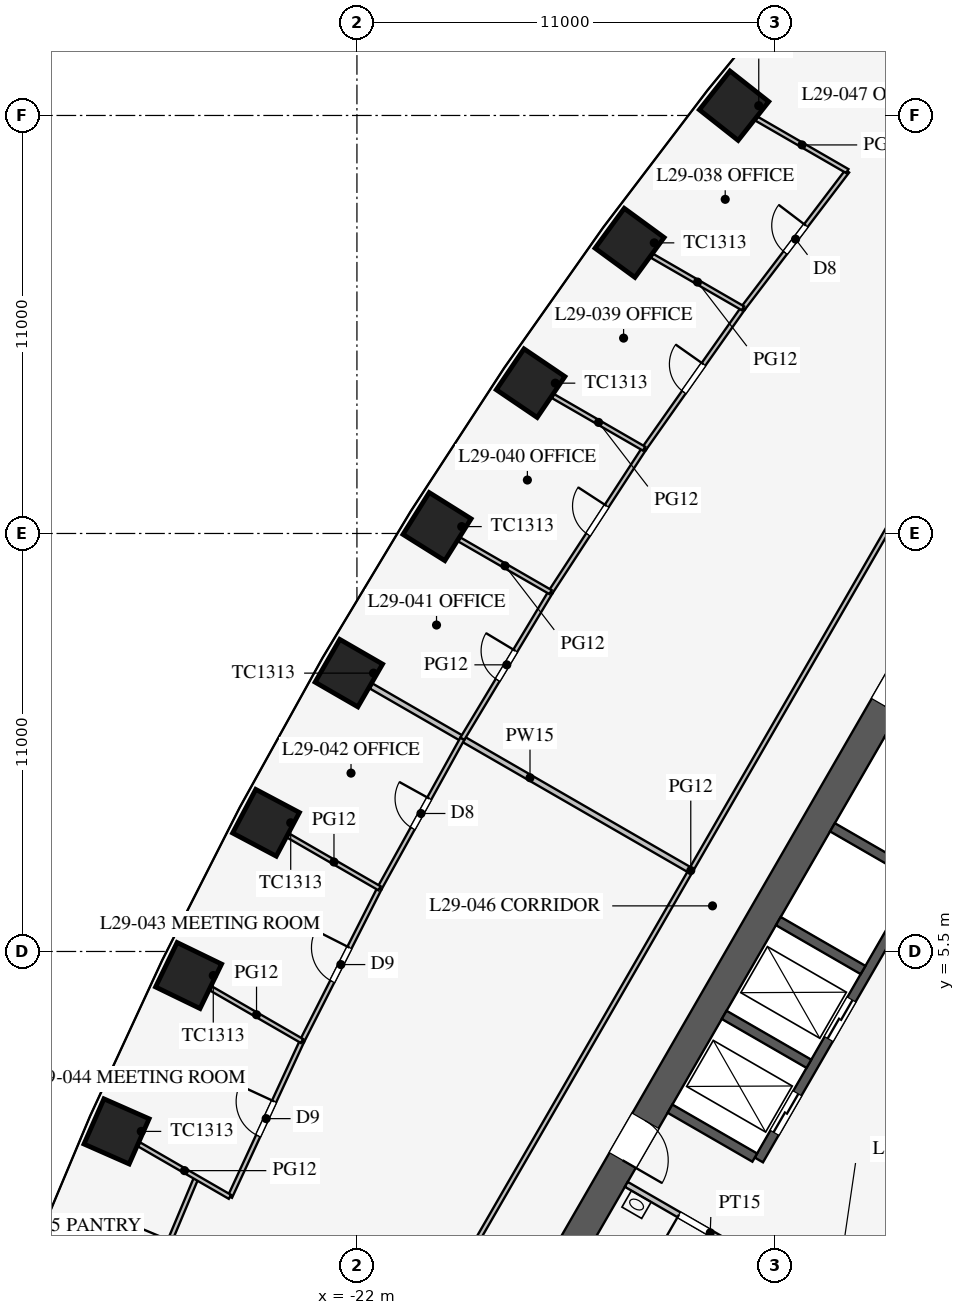
"""IFC4 building model, lengths in metres.
Left out: names, types, materials, properties, quantities, classifications, styles, units other than length and angle.
Written with IfcOpenShell. Run it as: python <this file> out.ifc"""

import sys

from ifc_helpers import new_model, si_unit, direction, frame, frame_2d, origin, origin_2d, place, context, subcontext, project, spatial, rectangle, extrude, element, fill, save


model = new_model("IFC4")
c1 = context("Model", 3, precision=1e-05, world=origin(), true_north=direction((0.0, 1.0)))
c2 = subcontext(c1, "Body", "Model", "MODEL_VIEW")
j1 = project(units=[si_unit("LENGTHUNIT", "METRE"), si_unit("PLANEANGLEUNIT", "RADIAN")], contexts=[c1])
p1 = place(None, origin())
s1 = spatial("IfcSite", under=j1, at=p1, CompositionType="ELEMENT")
p2 = place(p1, origin())
s2 = spatial("IfcBuilding", under=s1, at=p2, CompositionType="ELEMENT")
p3 = place(p2, frame((0.0, 0.0, 128.3)))
s3 = spatial("IfcBuildingStorey", under=s2, at=p3, CompositionType="ELEMENT", Elevation=128.3)
for number, where, z_axis, x_axis in (
    (1, (-12.077, 27.757, 0.0), (0.0, 0.0, 1.0), (-0.62, -0.785, 0.0)),
    (2, (-14.825, 24.148, 0.0), (0.0, 0.0, 1.0), (-0.591, -0.807, 0.0)),
    (3, (-17.43, 20.456, 0.0), (0.0, 0.0, 1.0), (-0.561, -0.828, 0.0)),
    (4, (-19.893, 16.681, 0.0), (0.0, 0.0, 1.0), (-0.531, -0.847, 0.0)),
    (5, (-22.213, 12.825, 0.0), (0.0, 0.0, 1.0), (-0.5, -0.866, 0.0)),
    (6, (-24.393, 8.887, 0.0), (0.0, 0.0, 1.0), (-0.468, -0.883, 0.0)),
    (7, (-26.43, 4.867, 0.0), (0.0, 0.0, 1.0), (-0.436, -0.9, 0.0)),
    (8, (-28.325, 0.765, 0.0), (0.0, 0.0, 1.0), (-0.403, -0.915, 0.0)),
):
    element("IfcColumn", number, at=place(p3, frame(where, z_axis=z_axis, x_axis=x_axis)), inside=s3, PredefinedType="COLUMN", context=c2, shape_type="SweptSolid", body=[
        extrude(rectangle(XDim=1.3, YDim=1.3, at=origin_2d()), origin(), (0.0, 0.0, 1.0), 4.2),
    ])
p4 = place(p3, frame((-5.773, 16.0, 0.0), z_axis=(0.0, 0.0, 1.0), x_axis=(-0.500002442456, -0.866023993627, 0.0)))
e9 = element("IfcWall", 9, at=p4, inside=s3, PredefinedType="SHEAR", context=c2, shape_type="SweptSolid", body=[
    extrude(rectangle(XDim=21.939, YDim=0.8, at=frame_2d((10.97, 0.0))), origin(), (0.0, 0.0, 1.0), 4.2),
])
p5 = place(p4, frame((17.27, 0.0, 0.0)))
e10 = element("IfcOpeningElement", 10, at=p5, cuts=e9, PredefinedType="OPENING", context=c2, shape_type="SweptSolid", body=[
    extrude(rectangle(XDim=1.2, YDim=2.1, at=frame_2d((0.6, 1.05))), frame((0.0, 0.41, 0.0), z_axis=(0.0, -1.0, 0.0), x_axis=(1.0, 0.0, 0.0)), (0.0, 0.0, 1.0), 0.82),
])
p6 = place(p4, frame((3.47, 0.0, 0.0)))
e11 = element("IfcOpeningElement", 11, at=p6, cuts=e9, PredefinedType="OPENING", context=c2, shape_type="SweptSolid", body=[
    extrude(rectangle(XDim=1.2, YDim=2.1, at=frame_2d((0.6, 1.05))), frame((0.0, 0.41, 0.0), z_axis=(0.0, -1.0, 0.0), x_axis=(1.0, 0.0, 0.0)), (0.0, 0.0, 1.0), 0.82),
])
p7 = place(p3, frame((-5.724, 9.886, 0.0), z_axis=(0.0, 0.0, 1.0), x_axis=(-0.500001763848, -0.866024385424, 0.0)))
e12 = element("IfcWall", 12, at=p7, inside=s3, PredefinedType="SHEAR", context=c2, shape_type="SweptSolid", body=[
    extrude(rectangle(XDim=11.4, YDim=0.25, at=frame_2d((5.7, 0.0))), origin(), (0.0, 0.0, 1.0), 4.2),
])
p8 = place(p7, frame((6.525, 0.0, 0.0)))
e13 = element("IfcOpeningElement", 13, at=p8, cuts=e12, PredefinedType="OPENING", context=c2, shape_type="SweptSolid", body=[
    extrude(rectangle(XDim=1.2, YDim=2.2, at=frame_2d((0.6, 1.1))), frame((0.0, 0.135, 0.0), z_axis=(0.0, -1.0, 0.0), x_axis=(1.0, 0.0, 0.0)), (0.0, 0.0, 1.0), 0.27),
])
p9 = place(p7, frame((9.375, 0.0, 0.0)))
e14 = element("IfcOpeningElement", 14, at=p9, cuts=e12, PredefinedType="OPENING", context=c2, shape_type="SweptSolid", body=[
    extrude(rectangle(XDim=1.2, YDim=2.2, at=frame_2d((0.6, 1.1))), frame((0.0, 0.135, 0.0), z_axis=(0.0, -1.0, 0.0), x_axis=(1.0, 0.0, 0.0)), (0.0, 0.0, 1.0), 0.27),
])
p10 = place(p3, frame((-5.832, 9.949, 0.0), z_axis=(0.0, 0.0, 1.0), x_axis=(-0.866029291668, 0.499993265928, 0.0)))
e15 = element("IfcWall", 15, at=p10, inside=s3, PredefinedType="SHEAR", context=c2, shape_type="SweptSolid", body=[
    extrude(rectangle(XDim=2.575, YDim=0.25, at=frame_2d((1.288, 0.0))), origin(), (0.0, 0.0, 1.0), 4.2),
])
for number, where, z_axis, x_axis in (
    (16, (-7.257, 7.481, 0.0), (0.0, 0.0, 1.0), (-0.866, 0.5, 0.0)),
    (17, (-8.682, 5.012, 0.0), (0.0, 0.0, 1.0), (-0.866, 0.5, 0.0)),
    (18, (-10.107, 2.544, 0.0), (0.0, 0.0, 1.0), (-0.866, 0.5, 0.0)),
    (19, (-11.532, 0.076, 0.0), (0.0, 0.0, 1.0), (-0.866, 0.5, 0.0)),
):
    element("IfcWall", number, at=place(p3, frame(where, z_axis=z_axis, x_axis=x_axis)), inside=s3, PredefinedType="SHEAR", context=c2, shape_type="SweptSolid", body=[
        extrude(rectangle(XDim=2.575, YDim=0.25, at=frame_2d((1.288, 0.0))), origin(), (0.0, 0.0, 1.0), 4.2),
    ])
p11 = place(p3, frame((-6.663, -1.509, 0.0), z_axis=(0.0, 0.0, 1.0), x_axis=(-0.866019375473, -0.500010441196, 0.0)))
e20 = element("IfcWall", 20, at=p11, inside=s3, PredefinedType="SHEAR", context=c2, shape_type="SweptSolid", body=[
    extrude(rectangle(XDim=9.075, YDim=0.6, at=frame_2d((4.538, 0.0))), origin(), (0.0, 0.0, 1.0), 4.2),
])
p12 = place(p3, frame((-10.495, -3.178, 0.0), z_axis=(0.0, 0.0, 1.0), x_axis=(-0.86602216432, 0.500005610874, 0.0)))
e21 = element("IfcWall", 21, at=p12, inside=s3, PredefinedType="PARTITIONING", context=c2, shape_type="SweptSolid", body=[
    extrude(rectangle(XDim=5.1, YDim=0.15, at=frame_2d((2.55, 0.0))), origin(), (0.0, 0.0, 1.0), 4.0),
])
p13 = place(p12, frame((2.6, 0.0, 0.0)))
e22 = element("IfcOpeningElement", 22, at=p13, cuts=e21, PredefinedType="OPENING", context=c2, shape_type="SweptSolid", body=[
    extrude(rectangle(XDim=0.9, YDim=2.1, at=frame_2d((0.45, 1.05))), frame((0.0, 0.085, 0.0), z_axis=(0.0, -1.0, 0.0), x_axis=(1.0, 0.0, 0.0)), (0.0, 0.0, 1.0), 0.17),
])
p14 = place(p3, frame((-13.268, 7.66, 0.0), z_axis=(0.0, 0.0, 1.0), x_axis=(-0.866015788683, 0.500016653474, 0.0)))
e23 = element("IfcWall", 23, at=p14, inside=s3, PredefinedType="PARTITIONING", context=c2, shape_type="SweptSolid", body=[
    extrude(rectangle(XDim=9.65, YDim=0.15, at=frame_2d((4.825, 0.0))), origin(), (0.0, 0.0, 1.0), 3.2),
])
p15 = place(p3, frame((-0.016, 30.491, 0.0), z_axis=(0.0, 0.0, 1.0), x_axis=(-0.50000091641, -0.866024874695, 0.0)))
e24 = element("IfcWall", 24, at=p15, inside=s3, PredefinedType="PARTITIONING", context=c2, shape_type="SweptSolid", body=[
    extrude(rectangle(XDim=52.796, YDim=0.12, at=frame_2d((26.398, 0.0))), origin(), (0.0, 0.0, 1.0), 2.9),
])
p16 = place(p15, frame((10.2, 0.0, 0.15)))
e25 = element("IfcOpeningElement", 25, at=p16, cuts=e24, PredefinedType="OPENING", context=c2, shape_type="SweptSolid", body=[
    extrude(rectangle(XDim=1.8, YDim=2.1, at=frame_2d((0.9, 1.05))), frame((0.0, 0.07, 0.0), z_axis=(0.0, -1.0, 0.0), x_axis=(1.0, 0.0, 0.0)), (0.0, 0.0, 1.0), 0.14),
])
p17 = place(p15, frame((40.8, 0.0, 0.15)))
e26 = element("IfcOpeningElement", 26, at=p17, cuts=e24, PredefinedType="OPENING", context=c2, shape_type="SweptSolid", body=[
    extrude(rectangle(XDim=1.8, YDim=2.1, at=frame_2d((0.9, 1.05))), frame((0.0, 0.07, 0.0), z_axis=(0.0, -1.0, 0.0), x_axis=(1.0, 0.0, 0.0)), (0.0, 0.0, 1.0), 0.14),
])
p18 = place(p3, frame((-19.226, 11.1, 0.0), z_axis=(0.0, 0.0, 1.0), x_axis=(-0.484292898211, -0.874905931368, 0.0)))
e27 = element("IfcWall", 27, at=p18, inside=s3, PredefinedType="PARTITIONING", context=c2, shape_type="SweptSolid", body=[
    extrude(rectangle(XDim=4.501, YDim=0.12, at=frame_2d((2.25, 0.0))), origin(), (0.0, 0.0, 1.0), 2.9),
])
p19 = place(p18, frame((1.8, 0.0, 0.15)))
e28 = element("IfcOpeningElement", 28, at=p19, cuts=e27, PredefinedType="OPENING", context=c2, shape_type="SweptSolid", body=[
    extrude(rectangle(XDim=0.9, YDim=2.1, at=frame_2d((0.45, 1.05))), frame((0.0, 0.07, 0.0), z_axis=(0.0, -1.0, 0.0), x_axis=(1.0, 0.0, 0.0)), (0.0, 0.0, 1.0), 0.14),
])
p20 = place(p3, frame((-26.225, -0.448, 0.0), z_axis=(0.0, 0.0, 1.0), x_axis=(-0.386762112496, -0.922179520667, 0.0)))
e29 = element("IfcWall", 29, at=p20, inside=s3, PredefinedType="PARTITIONING", context=c2, shape_type="SweptSolid", body=[
    extrude(rectangle(XDim=4.536, YDim=0.12, at=frame_2d((2.268, 0.0))), origin(), (0.0, 0.0, 1.0), 2.9),
])
p21 = place(p20, frame((1.8, 0.0, 0.15)))
e30 = element("IfcOpeningElement", 30, at=p21, cuts=e29, PredefinedType="OPENING", context=c2, shape_type="SweptSolid", body=[
    extrude(rectangle(XDim=0.9, YDim=2.1, at=frame_2d((0.45, 1.05))), frame((0.0, 0.07, 0.0), z_axis=(0.0, -1.0, 0.0), x_axis=(1.0, 0.0, 0.0)), (0.0, 0.0, 1.0), 0.14),
])
p22 = place(p3, frame((-21.405, 7.162, 0.0), z_axis=(0.0, 0.0, 1.0), x_axis=(-0.452471679136, -0.891778772779, 0.0)))
e31 = element("IfcWall", 31, at=p22, inside=s3, PredefinedType="PARTITIONING", context=c2, shape_type="SweptSolid", body=[
    extrude(rectangle(XDim=4.507, YDim=0.12, at=frame_2d((2.253, 0.0))), origin(), (0.0, 0.0, 1.0), 2.9),
])
p23 = place(p22, frame((1.75, 0.0, 0.15)))
e32 = element("IfcOpeningElement", 32, at=p23, cuts=e31, PredefinedType="OPENING", context=c2, shape_type="SweptSolid", body=[
    extrude(rectangle(XDim=1.0, YDim=2.1, at=frame_2d((0.5, 1.05))), frame((0.0, 0.07, 0.0), z_axis=(0.0, -1.0, 0.0), x_axis=(1.0, 0.0, 0.0)), (0.0, 0.0, 1.0), 0.14),
])
p24 = place(p3, frame((-23.444, 3.143, 0.0), z_axis=(0.0, 0.0, 1.0), x_axis=(-0.419883773418, -0.907577884713, 0.0)))
e33 = element("IfcWall", 33, at=p24, inside=s3, PredefinedType="PARTITIONING", context=c2, shape_type="SweptSolid", body=[
    extrude(rectangle(XDim=4.519, YDim=0.12, at=frame_2d((2.259, 0.0))), origin(), (0.0, 0.0, 1.0), 2.9),
])
p25 = place(p24, frame((1.75, 0.0, 0.15)))
e34 = element("IfcOpeningElement", 34, at=p25, cuts=e33, PredefinedType="OPENING", context=c2, shape_type="SweptSolid", body=[
    extrude(rectangle(XDim=1.0, YDim=2.1, at=frame_2d((0.5, 1.05))), frame((0.0, 0.07, 0.0), z_axis=(0.0, -1.0, 0.0), x_axis=(1.0, 0.0, 0.0)), (0.0, 0.0, 1.0), 0.14),
])
p26 = place(p3, frame((-11.842, 22.425, 0.0), z_axis=(0.0, 0.0, 1.0), x_axis=(-0.576023283708, -0.817433285734, 0.0)))
e35 = element("IfcWall", 35, at=p26, inside=s3, PredefinedType="PARTITIONING", context=c2, shape_type="SweptSolid", body=[
    extrude(rectangle(XDim=4.519, YDim=0.12, at=frame_2d((2.259, 0.0))), origin(), (0.0, 0.0, 1.0), 2.9),
])
p27 = place(p26, frame((1.8, 0.0, 0.15)))
e36 = element("IfcOpeningElement", 36, at=p27, cuts=e35, PredefinedType="OPENING", context=c2, shape_type="SweptSolid", body=[
    extrude(rectangle(XDim=0.9, YDim=2.1, at=frame_2d((0.45, 1.05))), frame((0.0, 0.07, 0.0), z_axis=(0.0, -1.0, 0.0), x_axis=(1.0, 0.0, 0.0)), (0.0, 0.0, 1.0), 0.14),
])
p28 = place(p3, frame((-9.096, 26.036, 0.0), z_axis=(0.0, 0.0, 1.0), x_axis=(-0.605240194184, -0.796042905467, 0.0)))
e37 = element("IfcWall", 37, at=p28, inside=s3, PredefinedType="PARTITIONING", context=c2, shape_type="SweptSolid", body=[
    extrude(rectangle(XDim=4.536, YDim=0.12, at=frame_2d((2.268, 0.0))), origin(), (0.0, 0.0, 1.0), 2.9),
])
p29 = place(p28, frame((1.8, 0.0, 0.15)))
e38 = element("IfcOpeningElement", 38, at=p29, cuts=e37, PredefinedType="OPENING", context=c2, shape_type="SweptSolid", body=[
    extrude(rectangle(XDim=0.9, YDim=2.1, at=frame_2d((0.45, 1.05))), frame((0.0, 0.07, 0.0), z_axis=(0.0, -1.0, 0.0), x_axis=(1.0, 0.0, 0.0)), (0.0, 0.0, 1.0), 0.14),
])
p30 = place(p3, frame((-16.905, 14.956, 0.0), z_axis=(0.0, 0.0, 1.0), x_axis=(-0.515548366618, -0.856860479703, 0.0)))
e39 = element("IfcWall", 39, at=p30, inside=s3, PredefinedType="PARTITIONING", context=c2, shape_type="SweptSolid", body=[
    extrude(rectangle(XDim=4.501, YDim=0.12, at=frame_2d((2.25, 0.0))), origin(), (0.0, 0.0, 1.0), 2.9),
])
p31 = place(p30, frame((1.8, 0.0, 0.15)))
e40 = element("IfcOpeningElement", 40, at=p31, cuts=e39, PredefinedType="OPENING", context=c2, shape_type="SweptSolid", body=[
    extrude(rectangle(XDim=0.9, YDim=2.1, at=frame_2d((0.45, 1.05))), frame((0.0, 0.07, 0.0), z_axis=(0.0, -1.0, 0.0), x_axis=(1.0, 0.0, 0.0)), (0.0, 0.0, 1.0), 0.14),
])
p32 = place(p3, frame((-14.444, 18.732, 0.0), z_axis=(0.0, 0.0, 1.0), x_axis=(-0.546069464151, -0.837739900161, 0.0)))
e41 = element("IfcWall", 41, at=p32, inside=s3, PredefinedType="PARTITIONING", context=c2, shape_type="SweptSolid", body=[
    extrude(rectangle(XDim=4.507, YDim=0.12, at=frame_2d((2.253, 0.0))), origin(), (0.0, 0.0, 1.0), 2.9),
])
p33 = place(p32, frame((1.8, 0.0, 0.15)))
e42 = element("IfcOpeningElement", 42, at=p33, cuts=e41, PredefinedType="OPENING", context=c2, shape_type="SweptSolid", body=[
    extrude(rectangle(XDim=0.9, YDim=2.1, at=frame_2d((0.45, 1.05))), frame((0.0, 0.07, 0.0), z_axis=(0.0, -1.0, 0.0), x_axis=(1.0, 0.0, 0.0)), (0.0, 0.0, 1.0), 0.14),
])
p34 = place(p3, frame((-25.342, -0.958, 0.0), z_axis=(0.0, 0.0, 1.0), x_axis=(-0.866014808974, 0.500018350302, 0.0)))
e43 = element("IfcWall", 43, at=p34, inside=s3, PredefinedType="PARTITIONING", context=c2, shape_type="SweptSolid", body=[
    extrude(rectangle(XDim=2.762, YDim=0.12, at=frame_2d((1.381, 0.0))), origin(), (0.0, 0.0, 1.0), 2.9),
])
p35 = place(p3, frame((-21.405, 7.162, 0.0), z_axis=(0.0, 0.0, 1.0), x_axis=(-0.866015261085, 0.500017567259, 0.0)))
e44 = element("IfcWall", 44, at=p35, inside=s3, PredefinedType="PARTITIONING", context=c2, shape_type="SweptSolid", body=[
    extrude(rectangle(XDim=2.769, YDim=0.12, at=frame_2d((1.385, 0.0))), origin(), (0.0, 0.0, 1.0), 2.9),
])
p36 = place(p3, frame((-23.444, 3.143, 0.0), z_axis=(0.0, 0.0, 1.0), x_axis=(-0.866023907196, 0.500002592159, 0.0)))
e45 = element("IfcWall", 45, at=p36, inside=s3, PredefinedType="PARTITIONING", context=c2, shape_type="SweptSolid", body=[
    extrude(rectangle(XDim=2.766, YDim=0.12, at=frame_2d((1.383, 0.0))), origin(), (0.0, 0.0, 1.0), 2.9),
])
p37 = place(p3, frame((-11.842, 22.425, 0.0), z_axis=(0.0, 0.0, 1.0), x_axis=(-0.866053089527, 0.499952043821, 0.0)))
e46 = element("IfcWall", 46, at=p37, inside=s3, PredefinedType="PARTITIONING", context=c2, shape_type="SweptSolid", body=[
    extrude(rectangle(XDim=2.761, YDim=0.12, at=frame_2d((1.381, 0.0))), origin(), (0.0, 0.0, 1.0), 2.9),
])
p38 = place(p3, frame((-9.096, 26.036, 0.0), z_axis=(0.0, 0.0, 1.0), x_axis=(-0.865975970311, 0.500085611514, 0.0)))
e47 = element("IfcWall", 47, at=p38, inside=s3, PredefinedType="PARTITIONING", context=c2, shape_type="SweptSolid", body=[
    extrude(rectangle(XDim=2.754, YDim=0.12, at=frame_2d((1.377, 0.0))), origin(), (0.0, 0.0, 1.0), 2.9),
])
p39 = place(p3, frame((-16.905, 14.956, 0.0), z_axis=(0.0, 0.0, 1.0), x_axis=(-0.866015261085, 0.500017567259, 0.0)))
e48 = element("IfcWall", 48, at=p39, inside=s3, PredefinedType="PARTITIONING", context=c2, shape_type="SweptSolid", body=[
    extrude(rectangle(XDim=2.769, YDim=0.12, at=frame_2d((1.385, 0.0))), origin(), (0.0, 0.0, 1.0), 2.9),
])
p40 = place(p3, frame((-14.444, 18.732, 0.0), z_axis=(0.0, 0.0, 1.0), x_axis=(-0.866023907196, 0.500002592159, 0.0)))
e49 = element("IfcWall", 49, at=p40, inside=s3, PredefinedType="PARTITIONING", context=c2, shape_type="SweptSolid", body=[
    extrude(rectangle(XDim=2.766, YDim=0.12, at=frame_2d((1.383, 0.0))), origin(), (0.0, 0.0, 1.0), 2.9),
])
p41 = place(p13, origin())
e50 = element("IfcDoor", 50, at=p41, inside=s3, OperationType="SINGLE_SWING_RIGHT", PredefinedType="DOOR", context=c2, shape_type="SweptSolid", body=[
    extrude(rectangle(XDim=0.9, YDim=2.1, at=frame_2d((0.45, 1.05))), frame((0.0, 0.025, 0.0), z_axis=(0.0, -1.0, 0.0), x_axis=(1.0, 0.0, 0.0)), (0.0, 0.0, 1.0), 0.05),
])
fill(e22, e50)
p42 = place(p5, origin())
e51 = element("IfcDoor", 51, at=p42, inside=s3, OperationType="SINGLE_SWING_RIGHT", PredefinedType="DOOR", context=c2, shape_type="SweptSolid", body=[
    extrude(rectangle(XDim=1.2, YDim=2.1, at=frame_2d((0.6, 1.05))), frame((0.0, 0.025, 0.0), z_axis=(0.0, -1.0, 0.0), x_axis=(1.0, 0.0, 0.0)), (0.0, 0.0, 1.0), 0.05),
])
fill(e10, e51)
p43 = place(p6, origin())
e52 = element("IfcDoor", 52, at=p43, inside=s3, OperationType="SINGLE_SWING_LEFT", PredefinedType="DOOR", context=c2, shape_type="SweptSolid", body=[
    extrude(rectangle(XDim=1.2, YDim=2.1, at=frame_2d((0.6, 1.05))), frame((0.0, 0.025, 0.0), z_axis=(0.0, -1.0, 0.0), x_axis=(1.0, 0.0, 0.0)), (0.0, 0.0, 1.0), 0.05),
])
fill(e11, e52)
p44 = place(p29, frame((0.9, 0.0, 0.0), z_axis=(0.0, 0.0, 1.0), x_axis=(-1.0, 0.0, 0.0)))
e53 = element("IfcDoor", 53, at=p44, inside=s3, OperationType="SINGLE_SWING_RIGHT", PredefinedType="DOOR", context=c2, shape_type="SweptSolid", body=[
    extrude(rectangle(XDim=0.9, YDim=2.1, at=frame_2d((0.45, 1.05))), frame((0.0, 0.025, 0.0), z_axis=(0.0, -1.0, 0.0), x_axis=(1.0, 0.0, 0.0)), (0.0, 0.0, 1.0), 0.05),
])
fill(e38, e53)
p45 = place(p27, frame((0.9, 0.0, 0.0), z_axis=(0.0, 0.0, 1.0), x_axis=(-1.0, 0.0, 0.0)))
e54 = element("IfcDoor", 54, at=p45, inside=s3, OperationType="SINGLE_SWING_RIGHT", PredefinedType="DOOR", context=c2, shape_type="SweptSolid", body=[
    extrude(rectangle(XDim=0.9, YDim=2.1, at=frame_2d((0.45, 1.05))), frame((0.0, 0.025, 0.0), z_axis=(0.0, -1.0, 0.0), x_axis=(1.0, 0.0, 0.0)), (0.0, 0.0, 1.0), 0.05),
])
fill(e36, e54)
p46 = place(p33, frame((0.9, 0.0, 0.0), z_axis=(0.0, 0.0, 1.0), x_axis=(-1.0, 0.0, 0.0)))
e55 = element("IfcDoor", 55, at=p46, inside=s3, OperationType="SINGLE_SWING_RIGHT", PredefinedType="DOOR", context=c2, shape_type="SweptSolid", body=[
    extrude(rectangle(XDim=0.9, YDim=2.1, at=frame_2d((0.45, 1.05))), frame((0.0, 0.025, 0.0), z_axis=(0.0, -1.0, 0.0), x_axis=(1.0, 0.0, 0.0)), (0.0, 0.0, 1.0), 0.05),
])
fill(e42, e55)
p47 = place(p31, frame((0.9, 0.0, 0.0), z_axis=(0.0, 0.0, 1.0), x_axis=(-1.0, 0.0, 0.0)))
e56 = element("IfcDoor", 56, at=p47, inside=s3, OperationType="SINGLE_SWING_RIGHT", PredefinedType="DOOR", context=c2, shape_type="SweptSolid", body=[
    extrude(rectangle(XDim=0.9, YDim=2.1, at=frame_2d((0.45, 1.05))), frame((0.0, 0.025, 0.0), z_axis=(0.0, -1.0, 0.0), x_axis=(1.0, 0.0, 0.0)), (0.0, 0.0, 1.0), 0.05),
])
fill(e40, e56)
p48 = place(p19, frame((0.9, 0.0, 0.0), z_axis=(0.0, 0.0, 1.0), x_axis=(-1.0, 0.0, 0.0)))
e57 = element("IfcDoor", 57, at=p48, inside=s3, OperationType="SINGLE_SWING_RIGHT", PredefinedType="DOOR", context=c2, shape_type="SweptSolid", body=[
    extrude(rectangle(XDim=0.9, YDim=2.1, at=frame_2d((0.45, 1.05))), frame((0.0, 0.025, 0.0), z_axis=(0.0, -1.0, 0.0), x_axis=(1.0, 0.0, 0.0)), (0.0, 0.0, 1.0), 0.05),
])
fill(e28, e57)
p49 = place(p23, frame((1.0, 0.0, 0.0), z_axis=(0.0, 0.0, 1.0), x_axis=(-1.0, 0.0, 0.0)))
e58 = element("IfcDoor", 58, at=p49, inside=s3, OperationType="SINGLE_SWING_RIGHT", PredefinedType="DOOR", context=c2, shape_type="SweptSolid", body=[
    extrude(rectangle(XDim=1.0, YDim=2.1, at=frame_2d((0.5, 1.05))), frame((0.0, 0.025, 0.0), z_axis=(0.0, -1.0, 0.0), x_axis=(1.0, 0.0, 0.0)), (0.0, 0.0, 1.0), 0.05),
])
fill(e32, e58)
p50 = place(p25, frame((1.0, 0.0, 0.0), z_axis=(0.0, 0.0, 1.0), x_axis=(-1.0, 0.0, 0.0)))
e59 = element("IfcDoor", 59, at=p50, inside=s3, OperationType="SINGLE_SWING_RIGHT", PredefinedType="DOOR", context=c2, shape_type="SweptSolid", body=[
    extrude(rectangle(XDim=1.0, YDim=2.1, at=frame_2d((0.5, 1.05))), frame((0.0, 0.025, 0.0), z_axis=(0.0, -1.0, 0.0), x_axis=(1.0, 0.0, 0.0)), (0.0, 0.0, 1.0), 0.05),
])
fill(e34, e59)
p51 = place(p8, origin())
e60 = element("IfcDoor", 60, at=p51, inside=s3, OperationType="DOUBLE_DOOR_SLIDING", PredefinedType="DOOR", context=c2, shape_type="SweptSolid", body=[
    extrude(rectangle(XDim=1.2, YDim=2.2, at=frame_2d((0.6, 1.1))), frame((0.0, 0.025, 0.0), z_axis=(0.0, -1.0, 0.0), x_axis=(1.0, 0.0, 0.0)), (0.0, 0.0, 1.0), 0.05),
])
fill(e13, e60)
p52 = place(p9, origin())
e61 = element("IfcDoor", 61, at=p52, inside=s3, OperationType="DOUBLE_DOOR_SLIDING", PredefinedType="DOOR", context=c2, shape_type="SweptSolid", body=[
    extrude(rectangle(XDim=1.2, YDim=2.2, at=frame_2d((0.6, 1.1))), frame((0.0, 0.025, 0.0), z_axis=(0.0, -1.0, 0.0), x_axis=(1.0, 0.0, 0.0)), (0.0, 0.0, 1.0), 0.05),
])
fill(e14, e61)
save(model, sys.argv[1])
